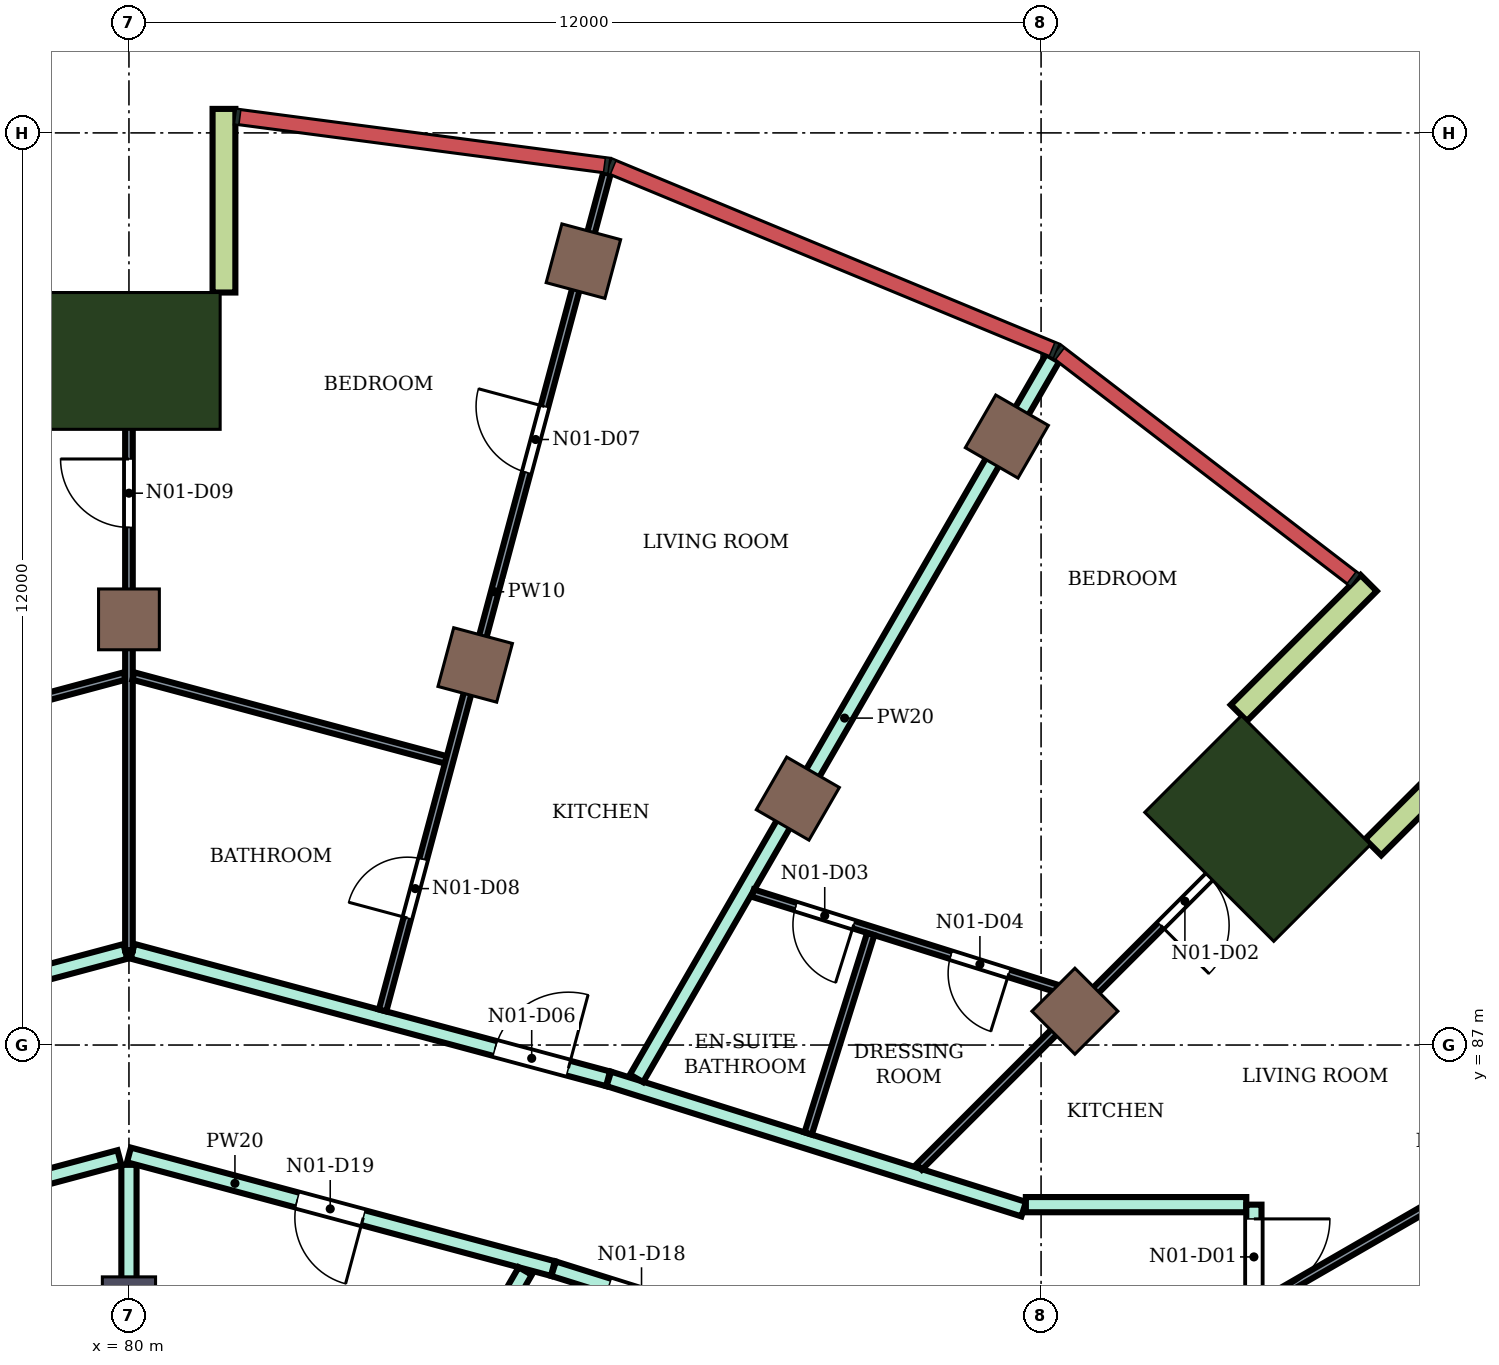
"""IFC4 building model, lengths in metres.
Left out: names, types, materials, properties, quantities, classifications, styles, units other than length and angle.
Written with IfcOpenShell. Run it as: python <this file> out.ifc"""

import sys

from ifc_helpers import new_model, si_unit, direction, frame, frame_2d, origin, origin_2d, place, context, subcontext, project, spatial, rectangle, extrude, element, fill, save


model = new_model("IFC4")
c1 = context("Model", 3, precision=1e-05, world=origin(), true_north=direction((0.0, 1.0)))
c2 = subcontext(c1, "Body", "Model", "MODEL_VIEW")
j1 = project(units=[si_unit("LENGTHUNIT", "METRE"), si_unit("PLANEANGLEUNIT", "RADIAN")], contexts=[c1])
p1 = place(None, origin())
s1 = spatial("IfcSite", under=j1, at=p1, CompositionType="ELEMENT")
p2 = place(p1, origin())
s2 = spatial("IfcBuilding", under=s1, at=p2, CompositionType="ELEMENT")
p3 = place(p2, frame((0.0, 0.0, 284.1)))
s3 = spatial("IfcBuildingStorey", under=s2, at=p3, CompositionType="ELEMENT", Elevation=284.1)
for number, where, z_axis, x_axis in (
    (1, (91.55, 95.005, 0.0), (0.0, 0.0, 1.0), (0.5, 0.866, 0.0)),
    (2, (85.979, 97.313, 0.0), (0.0, 0.0, 1.0), (0.259, 0.966, 0.0)),
    (3, (92.445, 87.445, 0.0), (0.0, 0.0, 1.0), (0.707, 0.707, 0.0)),
    (4, (88.8, 90.242, 0.0), (0.0, 0.0, 1.0), (0.5, 0.866, 0.0)),
    (5, (84.555, 92.0, 0.0), (0.0, 0.0, 1.0), (0.259, 0.966, 0.0)),
    (6, (80.0, 92.6, 0.0), (0.0, 0.0, 1.0), (0.0, 1.0, 0.0)),
):
    element("IfcColumn", number, at=place(p3, frame(where, z_axis=z_axis, x_axis=x_axis)), inside=s3, PredefinedType="COLUMN", context=c2, shape_type="SweptSolid", body=[
        extrude(rectangle(XDim=0.8, YDim=0.8, at=origin_2d()), origin(), (0.0, 0.0, 1.0), 4.2),
    ])
p4 = place(p3, frame((80.0, 83.6, 0.0), z_axis=(0.0, 0.0, 1.0), x_axis=(0.0, 1.0, 0.0)))
e7 = element("IfcColumn", 7, at=p4, inside=s3, PredefinedType="COLUMN", context=c2, shape_type="SweptSolid", body=[
    extrude(rectangle(XDim=0.7, YDim=0.7, at=origin_2d()), origin(), (0.0, 0.0, 1.0), 4.2),
])
for number, where, z_axis, x_axis in (
    (8, (94.849, 89.849, 0.0), (0.0, 0.0, 1.0), (0.707, 0.707, 0.0)),
    (9, (80.0, 96.0, 0.0), (0.0, 0.0, 1.0), (0.0, 1.0, 0.0)),
):
    element("IfcColumn", number, at=place(p3, frame(where, z_axis=z_axis, x_axis=x_axis)), inside=s3, PredefinedType="COLUMN", context=c2, shape_type="SweptSolid", body=[
        extrude(rectangle(XDim=1.8, YDim=2.4, at=origin_2d()), origin(), (0.0, 0.0, 1.0), 4.2),
    ])
for number, where, z_axis, x_axis in (
    (10, (96.37, 89.602, 0.0), (0.0, 0.0, 1.0), (0.707, 0.707, 0.0)),
    (11, (94.602, 91.37, 0.0), (0.0, 0.0, 1.0), (0.707, 0.707, 0.0)),
):
    element("IfcWall", number, at=place(p3, frame(where, z_axis=z_axis, x_axis=x_axis)), inside=s3, PredefinedType="NOTDEFINED", context=c2, shape_type="SweptSolid", body=[
        extrude(rectangle(XDim=2.416, YDim=0.3, at=frame_2d((1.208, 0.0))), origin(), (0.0, 0.0, 1.0), 4.2),
    ])
p5 = place(p3, frame((81.25, 96.9, 0.0), z_axis=(0.0, 0.0, 1.0), x_axis=(0.0, 1.0, 0.0)))
e12 = element("IfcWall", 12, at=p5, inside=s3, PredefinedType="NOTDEFINED", context=c2, shape_type="SweptSolid", body=[
    extrude(rectangle(XDim=2.416, YDim=0.3, at=frame_2d((1.208, 0.0))), origin(), (0.0, 0.0, 1.0), 4.2),
])
p6 = place(p3, frame((73.687, 86.554, 0.0), z_axis=(0.0, 0.0, 1.0), x_axis=(0.966002126521, 0.258534120682, 0.0)))
e13 = element("IfcWall", 13, at=p6, inside=s3, PredefinedType="PARTITIONING", context=c2, shape_type="SweptSolid", body=[
    extrude(rectangle(XDim=6.486, YDim=0.2, at=frame_2d((3.243, 0.0))), origin(), (0.0, 0.0, 1.0), 3.75),
])
p7 = place(p3, frame((74.413, 84.057, 0.0), z_axis=(0.0, 0.0, 1.0), x_axis=(0.965972135939, 0.258646153246, 0.0)))
e14 = element("IfcWall", 14, at=p7, inside=s3, PredefinedType="PARTITIONING", context=c2, shape_type="SweptSolid", body=[
    extrude(rectangle(XDim=5.654, YDim=0.2, at=frame_2d((2.827, 0.0))), origin(), (0.0, 0.0, 1.0), 3.75),
])
p8 = place(p7, frame((2.593, 0.0, 0.0)))
e15 = element("IfcOpeningElement", 15, at=p8, cuts=e14, PredefinedType="OPENING", context=c2, shape_type="SweptSolid", body=[
    extrude(rectangle(XDim=0.9, YDim=2.1, at=frame_2d((0.45, 1.05))), frame((0.0, 0.11, 0.0), z_axis=(0.0, -1.0, 0.0), x_axis=(1.0, 0.0, 0.0)), (0.0, 0.0, 1.0), 0.22),
])
p9 = place(p3, frame((80.0, 82.699, 0.0), z_axis=(0.0, 0.0, 1.0), x_axis=(0.0, 1.0, 0.0)))
e16 = element("IfcWall", 16, at=p9, inside=s3, PredefinedType="PARTITIONING", context=c2, shape_type="SweptSolid", body=[
    extrude(rectangle(XDim=2.725, YDim=0.2, at=frame_2d((1.363, 0.0))), origin(), (0.0, 0.0, 1.0), 3.75),
])
p10 = place(p3, frame((80.0, 85.554, 0.0), z_axis=(0.0, 0.0, 1.0), x_axis=(0.965928989968, -0.258807237802, 0.0)))
e17 = element("IfcWall", 17, at=p10, inside=s3, PredefinedType="PARTITIONING", context=c2, shape_type="SweptSolid", body=[
    extrude(rectangle(XDim=5.774, YDim=0.2, at=frame_2d((2.887, 0.0))), origin(), (0.0, 0.0, 1.0), 3.75),
])
p11 = place(p10, frame((2.292, 0.0, 0.0)))
e18 = element("IfcOpeningElement", 18, at=p11, cuts=e17, PredefinedType="OPENING", context=c2, shape_type="SweptSolid", body=[
    extrude(rectangle(XDim=0.9, YDim=2.1, at=frame_2d((0.45, 1.05))), frame((0.0, 0.11, 0.0), z_axis=(0.0, -1.0, 0.0), x_axis=(1.0, 0.0, 0.0)), (0.0, 0.0, 1.0), 0.22),
])
p12 = place(p3, frame((80.048, 88.233, 0.0), z_axis=(0.0, 0.0, 1.0), x_axis=(0.965865387308, -0.259044501198, 0.0)))
e19 = element("IfcWall", 19, at=p12, inside=s3, PredefinedType="PARTITIONING", context=c2, shape_type="SweptSolid", body=[
    extrude(rectangle(XDim=6.476, YDim=0.2, at=frame_2d((3.238, 0.0))), origin(), (0.0, 0.0, 1.0), 3.75),
])
p13 = place(p12, frame((4.936, 0.0, 0.0)))
e20 = element("IfcOpeningElement", 20, at=p13, cuts=e19, PredefinedType="OPENING", context=c2, shape_type="SweptSolid", body=[
    extrude(rectangle(XDim=1.0, YDim=2.1, at=frame_2d((0.5, 1.05))), frame((0.0, 0.11, 0.0), z_axis=(0.0, -1.0, 0.0), x_axis=(1.0, 0.0, 0.0)), (0.0, 0.0, 1.0), 0.22),
])
p14 = place(p3, frame((83.85, 81.666, 0.0), z_axis=(0.0, 0.0, 1.0), x_axis=(0.500146274735, 0.865940935554, 0.0)))
e21 = element("IfcWall", 21, at=p14, inside=s3, PredefinedType="PARTITIONING", context=c2, shape_type="SweptSolid", body=[
    extrude(rectangle(XDim=2.726, YDim=0.2, at=frame_2d((1.363, 0.0))), origin(), (0.0, 0.0, 1.0), 3.75),
])
p15 = place(p3, frame((85.587, 84.057, 0.0), z_axis=(0.0, 0.0, 1.0), x_axis=(0.954239513179, -0.299043393987, 0.0)))
e22 = element("IfcWall", 22, at=p15, inside=s3, PredefinedType="PARTITIONING", context=c2, shape_type="SweptSolid", body=[
    extrude(rectangle(XDim=2.424, YDim=0.2, at=frame_2d((1.212, 0.0))), origin(), (0.0, 0.0, 1.0), 3.75),
])
p16 = place(p15, frame((0.762, 0.0, 0.0)))
e23 = element("IfcOpeningElement", 23, at=p16, cuts=e22, PredefinedType="OPENING", context=c2, shape_type="SweptSolid", body=[
    extrude(rectangle(XDim=0.9, YDim=2.1, at=frame_2d((0.45, 1.05))), frame((0.0, 0.11, 0.0), z_axis=(0.0, -1.0, 0.0), x_axis=(1.0, 0.0, 0.0)), (0.0, 0.0, 1.0), 0.22),
])
p17 = place(p3, frame((86.313, 86.554, 0.0), z_axis=(0.0, 0.0, 1.0), x_axis=(0.954089584911, -0.299521391497, 0.0)))
e24 = element("IfcWall", 24, at=p17, inside=s3, PredefinedType="PARTITIONING", context=c2, shape_type="SweptSolid", body=[
    extrude(rectangle(XDim=5.72, YDim=0.2, at=frame_2d((2.86, 0.0))), origin(), (0.0, 0.0, 1.0), 3.75),
])
p18 = place(p3, frame((86.678, 86.562, 0.0), z_axis=(0.0, 0.0, 1.0), x_axis=(0.500133037155, 0.865948581122, 0.0)))
e25 = element("IfcWall", 25, at=p18, inside=s3, PredefinedType="PARTITIONING", context=c2, shape_type="SweptSolid", body=[
    extrude(rectangle(XDim=10.946, YDim=0.2, at=frame_2d((5.473, 0.0))), origin(), (0.0, 0.0, 1.0), 3.75),
])
p19 = place(p3, frame((91.8, 84.9, 0.0), z_axis=(0.0, 0.0, 1.0), x_axis=(1.0, 0.0, 0.0)))
e26 = element("IfcWall", 26, at=p19, inside=s3, PredefinedType="PARTITIONING", context=c2, shape_type="SweptSolid", body=[
    extrude(rectangle(XDim=2.9, YDim=0.2, at=frame_2d((1.45, 0.0))), origin(), (0.0, 0.0, 1.0), 3.75),
])
p20 = place(p3, frame((94.8, 83.65, 0.0), z_axis=(0.0, 0.0, 1.0), x_axis=(0.0, 1.0, 0.0)))
e27 = element("IfcWall", 27, at=p20, inside=s3, PredefinedType="PARTITIONING", context=c2, shape_type="SweptSolid", body=[
    extrude(rectangle(XDim=1.25, YDim=0.2, at=frame_2d((0.625, 0.0))), origin(), (0.0, 0.0, 1.0), 3.75),
])
p21 = place(p20, frame((0.062, 0.0, 0.0)))
e28 = element("IfcOpeningElement", 28, at=p21, cuts=e27, PredefinedType="OPENING", context=c2, shape_type="SweptSolid", body=[
    extrude(rectangle(XDim=1.0, YDim=2.1, at=frame_2d((0.5, 1.05))), frame((0.0, 0.11, 0.0), z_axis=(0.0, -1.0, 0.0), x_axis=(1.0, 0.0, 0.0)), (0.0, 0.0, 1.0), 0.22),
])
p22 = place(p3, frame((75.832, 90.752, 0.0), z_axis=(0.0, 0.0, 1.0), x_axis=(0.965856843682, 0.259076354601, 0.0)))
e29 = element("IfcWall", 29, at=p22, inside=s3, PredefinedType="PARTITIONING", context=c2, shape_type="SweptSolid", body=[
    extrude(rectangle(XDim=4.256, YDim=0.1, at=frame_2d((2.128, 0.0))), origin(), (0.0, 0.0, 1.0), 3.75),
])
p23 = place(p22, frame((1.733, 0.0, 0.0)))
e30 = element("IfcOpeningElement", 30, at=p23, cuts=e29, PredefinedType="OPENING", context=c2, shape_type="SweptSolid", body=[
    extrude(rectangle(XDim=0.8, YDim=2.1, at=frame_2d((0.4, 1.05))), frame((0.0, 0.06, 0.0), z_axis=(0.0, -1.0, 0.0), x_axis=(1.0, 0.0, 0.0)), (0.0, 0.0, 1.0), 0.12),
])
p24 = place(p3, frame((80.0, 88.246, 0.0), z_axis=(0.0, 0.0, 1.0), x_axis=(0.0, 1.0, 0.0)))
e31 = element("IfcWall", 31, at=p24, inside=s3, PredefinedType="PARTITIONING", context=c2, shape_type="SweptSolid", body=[
    extrude(rectangle(XDim=8.454, YDim=0.1, at=frame_2d((4.227, 0.0))), origin(), (0.0, 0.0, 1.0), 3.75),
])
p25 = place(p24, frame((5.564, 0.0, 0.0)))
e32 = element("IfcOpeningElement", 32, at=p25, cuts=e31, PredefinedType="OPENING", context=c2, shape_type="SweptSolid", body=[
    extrude(rectangle(XDim=0.9, YDim=2.1, at=frame_2d((0.45, 1.05))), frame((0.0, 0.06, 0.0), z_axis=(0.0, -1.0, 0.0), x_axis=(1.0, 0.0, 0.0)), (0.0, 0.0, 1.0), 0.12),
])
p26 = place(p3, frame((80.058, 91.854, 0.0), z_axis=(0.0, 0.0, 1.0), x_axis=(0.96586069397, -0.259061999998, 0.0)))
e33 = element("IfcWall", 33, at=p26, inside=s3, PredefinedType="PARTITIONING", context=c2, shape_type="SweptSolid", body=[
    extrude(rectangle(XDim=4.256, YDim=0.1, at=frame_2d((2.128, 0.0))), origin(), (0.0, 0.0, 1.0), 3.75),
])
p27 = place(p3, frame((83.337, 87.455, 0.0), z_axis=(0.0, 0.0, 1.0), x_axis=(0.25887234328, 0.965911543509, 0.0)))
e34 = element("IfcWall", 34, at=p27, inside=s3, PredefinedType="PARTITIONING", context=c2, shape_type="SweptSolid", body=[
    extrude(rectangle(XDim=11.404, YDim=0.1, at=frame_2d((5.702, 0.0))), origin(), (0.0, 0.0, 1.0), 3.75),
])
p28 = place(p27, frame((7.326, 0.0, 0.0)))
e35 = element("IfcOpeningElement", 35, at=p28, cuts=e34, PredefinedType="OPENING", context=c2, shape_type="SweptSolid", body=[
    extrude(rectangle(XDim=0.9, YDim=2.1, at=frame_2d((0.45, 1.05))), frame((0.0, 0.06, 0.0), z_axis=(0.0, -1.0, 0.0), x_axis=(1.0, 0.0, 0.0)), (0.0, 0.0, 1.0), 0.12),
])
p29 = place(p27, frame((1.26, 0.0, 0.0)))
e36 = element("IfcOpeningElement", 36, at=p29, cuts=e34, PredefinedType="OPENING", context=c2, shape_type="SweptSolid", body=[
    extrude(rectangle(XDim=0.8, YDim=2.1, at=frame_2d((0.4, 1.05))), frame((0.0, 0.06, 0.0), z_axis=(0.0, -1.0, 0.0), x_axis=(1.0, 0.0, 0.0)), (0.0, 0.0, 1.0), 0.12),
])
p30 = place(p3, frame((88.207, 88.999, 0.0), z_axis=(0.0, 0.0, 1.0), x_axis=(0.954166656768, -0.29927577769, 0.0)))
e37 = element("IfcWall", 37, at=p30, inside=s3, PredefinedType="PARTITIONING", context=c2, shape_type="SweptSolid", body=[
    extrude(rectangle(XDim=4.542, YDim=0.1, at=frame_2d((2.271, 0.0))), origin(), (0.0, 0.0, 1.0), 3.75),
])
p31 = place(p30, frame((0.592, 0.0, 0.0)))
e38 = element("IfcOpeningElement", 38, at=p31, cuts=e37, PredefinedType="OPENING", context=c2, shape_type="SweptSolid", body=[
    extrude(rectangle(XDim=0.8, YDim=2.1, at=frame_2d((0.4, 1.05))), frame((0.0, 0.06, 0.0), z_axis=(0.0, -1.0, 0.0), x_axis=(1.0, 0.0, 0.0)), (0.0, 0.0, 1.0), 0.12),
])
p32 = place(p30, frame((2.732, 0.0, 0.0)))
e39 = element("IfcOpeningElement", 39, at=p32, cuts=e37, PredefinedType="OPENING", context=c2, shape_type="SweptSolid", body=[
    extrude(rectangle(XDim=0.8, YDim=2.1, at=frame_2d((0.4, 1.05))), frame((0.0, 0.06, 0.0), z_axis=(0.0, -1.0, 0.0), x_axis=(1.0, 0.0, 0.0)), (0.0, 0.0, 1.0), 0.12),
])
p33 = place(p3, frame((88.936, 85.836, 0.0), z_axis=(0.0, 0.0, 1.0), x_axis=(0.299371771011, 0.954136543018, 0.0)))
e40 = element("IfcWall", 40, at=p33, inside=s3, PredefinedType="PARTITIONING", context=c2, shape_type="SweptSolid", body=[
    extrude(rectangle(XDim=2.75, YDim=0.1, at=frame_2d((1.375, 0.0))), origin(), (0.0, 0.0, 1.0), 3.75),
])
p34 = place(p3, frame((90.395, 85.395, 0.0), z_axis=(0.0, 0.0, 1.0), x_axis=(0.707106781187, 0.707106781187, 0.0)))
e41 = element("IfcWall", 41, at=p34, inside=s3, PredefinedType="PARTITIONING", context=c2, shape_type="SweptSolid", body=[
    extrude(rectangle(XDim=7.0, YDim=0.1, at=frame_2d((3.5, 0.0))), origin(), (0.0, 0.0, 1.0), 3.75),
])
p35 = place(p34, frame((4.496, 0.0, 0.0)))
e42 = element("IfcOpeningElement", 42, at=p35, cuts=e41, PredefinedType="OPENING", context=c2, shape_type="SweptSolid", body=[
    extrude(rectangle(XDim=0.9, YDim=2.1, at=frame_2d((0.45, 1.05))), frame((0.0, 0.06, 0.0), z_axis=(0.0, -1.0, 0.0), x_axis=(1.0, 0.0, 0.0)), (0.0, 0.0, 1.0), 0.12),
])
p36 = place(p3, frame((94.8, 83.545, 0.0), z_axis=(0.0, 0.0, 1.0), x_axis=(0.866044015472, 0.499967762227, 0.0)))
e43 = element("IfcWall", 43, at=p36, inside=s3, PredefinedType="PARTITIONING", context=c2, shape_type="SweptSolid", body=[
    extrude(rectangle(XDim=7.208, YDim=0.1, at=frame_2d((3.604, 0.0))), origin(), (0.0, 0.0, 1.0), 3.75),
])
p37 = place(p36, frame((3.129, 0.0, 0.0)))
e44 = element("IfcOpeningElement", 44, at=p37, cuts=e43, PredefinedType="OPENING", context=c2, shape_type="SweptSolid", body=[
    extrude(rectangle(XDim=0.9, YDim=2.1, at=frame_2d((0.45, 1.05))), frame((0.0, 0.06, 0.0), z_axis=(0.0, -1.0, 0.0), x_axis=(1.0, 0.0, 0.0)), (0.0, 0.0, 1.0), 0.12),
])
p38 = place(p21, frame((1.0, 0.0, 0.0), z_axis=(0.0, 0.0, 1.0), x_axis=(-1.0, 0.0, 0.0)))
e45 = element("IfcDoor", 45, at=p38, inside=s3, OperationType="SINGLE_SWING_LEFT", PredefinedType="DOOR", context=c2, shape_type="SweptSolid", body=[
    extrude(rectangle(XDim=1.0, YDim=2.1, at=frame_2d((0.5, 1.05))), frame((0.0, 0.025, 0.0), z_axis=(0.0, -1.0, 0.0), x_axis=(1.0, 0.0, 0.0)), (0.0, 0.0, 1.0), 0.05),
])
fill(e28, e45)
p39 = place(p35, frame((0.9, 0.0, 0.0), z_axis=(0.0, 0.0, 1.0), x_axis=(-1.0, 0.0, 0.0)))
e46 = element("IfcDoor", 46, at=p39, inside=s3, OperationType="SINGLE_SWING_RIGHT", PredefinedType="DOOR", context=c2, shape_type="SweptSolid", body=[
    extrude(rectangle(XDim=0.9, YDim=2.1, at=frame_2d((0.45, 1.05))), frame((0.0, 0.025, 0.0), z_axis=(0.0, -1.0, 0.0), x_axis=(1.0, 0.0, 0.0)), (0.0, 0.0, 1.0), 0.05),
])
fill(e42, e46)
p40 = place(p31, frame((0.8, 0.0, 0.0), z_axis=(0.0, 0.0, 1.0), x_axis=(-1.0, 0.0, 0.0)))
e47 = element("IfcDoor", 47, at=p40, inside=s3, OperationType="SINGLE_SWING_LEFT", PredefinedType="DOOR", context=c2, shape_type="SweptSolid", body=[
    extrude(rectangle(XDim=0.8, YDim=2.1, at=frame_2d((0.4, 1.05))), frame((0.0, 0.025, 0.0), z_axis=(0.0, -1.0, 0.0), x_axis=(1.0, 0.0, 0.0)), (0.0, 0.0, 1.0), 0.05),
])
fill(e38, e47)
p41 = place(p32, frame((0.8, 0.0, 0.0), z_axis=(0.0, 0.0, 1.0), x_axis=(-1.0, 0.0, 0.0)))
e48 = element("IfcDoor", 48, at=p41, inside=s3, OperationType="SINGLE_SWING_LEFT", PredefinedType="DOOR", context=c2, shape_type="SweptSolid", body=[
    extrude(rectangle(XDim=0.8, YDim=2.1, at=frame_2d((0.4, 1.05))), frame((0.0, 0.025, 0.0), z_axis=(0.0, -1.0, 0.0), x_axis=(1.0, 0.0, 0.0)), (0.0, 0.0, 1.0), 0.05),
])
fill(e39, e48)
p42 = place(p13, origin())
e49 = element("IfcDoor", 49, at=p42, inside=s3, OperationType="SINGLE_SWING_RIGHT", PredefinedType="DOOR", context=c2, shape_type="SweptSolid", body=[
    extrude(rectangle(XDim=1.0, YDim=2.1, at=frame_2d((0.5, 1.05))), frame((0.0, 0.025, 0.0), z_axis=(0.0, -1.0, 0.0), x_axis=(1.0, 0.0, 0.0)), (0.0, 0.0, 1.0), 0.05),
])
fill(e20, e49)
p43 = place(p28, origin())
e50 = element("IfcDoor", 50, at=p43, inside=s3, OperationType="SINGLE_SWING_RIGHT", PredefinedType="DOOR", context=c2, shape_type="SweptSolid", body=[
    extrude(rectangle(XDim=0.9, YDim=2.1, at=frame_2d((0.45, 1.05))), frame((0.0, 0.025, 0.0), z_axis=(0.0, -1.0, 0.0), x_axis=(1.0, 0.0, 0.0)), (0.0, 0.0, 1.0), 0.05),
])
fill(e35, e50)
p44 = place(p29, origin())
e51 = element("IfcDoor", 51, at=p44, inside=s3, OperationType="SINGLE_SWING_LEFT", PredefinedType="DOOR", context=c2, shape_type="SweptSolid", body=[
    extrude(rectangle(XDim=0.8, YDim=2.1, at=frame_2d((0.4, 1.05))), frame((0.0, 0.025, 0.0), z_axis=(0.0, -1.0, 0.0), x_axis=(1.0, 0.0, 0.0)), (0.0, 0.0, 1.0), 0.05),
])
fill(e36, e51)
p45 = place(p25, origin())
e52 = element("IfcDoor", 52, at=p45, inside=s3, OperationType="SINGLE_SWING_RIGHT", PredefinedType="DOOR", context=c2, shape_type="SweptSolid", body=[
    extrude(rectangle(XDim=0.9, YDim=2.1, at=frame_2d((0.45, 1.05))), frame((0.0, 0.025, 0.0), z_axis=(0.0, -1.0, 0.0), x_axis=(1.0, 0.0, 0.0)), (0.0, 0.0, 1.0), 0.05),
])
fill(e32, e52)
p46 = place(p16, frame((0.9, 0.0, 0.0), z_axis=(0.0, 0.0, 1.0), x_axis=(-1.0, 0.0, 0.0)))
e53 = element("IfcDoor", 53, at=p46, inside=s3, OperationType="SINGLE_SWING_LEFT", PredefinedType="DOOR", context=c2, shape_type="SweptSolid", body=[
    extrude(rectangle(XDim=0.9, YDim=2.1, at=frame_2d((0.45, 1.05))), frame((0.0, 0.025, 0.0), z_axis=(0.0, -1.0, 0.0), x_axis=(1.0, 0.0, 0.0)), (0.0, 0.0, 1.0), 0.05),
])
fill(e23, e53)
p47 = place(p11, frame((0.9, 0.0, 0.0), z_axis=(0.0, 0.0, 1.0), x_axis=(-1.0, 0.0, 0.0)))
e54 = element("IfcDoor", 54, at=p47, inside=s3, OperationType="SINGLE_SWING_LEFT", PredefinedType="DOOR", context=c2, shape_type="SweptSolid", body=[
    extrude(rectangle(XDim=0.9, YDim=2.1, at=frame_2d((0.45, 1.05))), frame((0.0, 0.025, 0.0), z_axis=(0.0, -1.0, 0.0), x_axis=(1.0, 0.0, 0.0)), (0.0, 0.0, 1.0), 0.05),
])
fill(e18, e54)
save(model, sys.argv[1])
